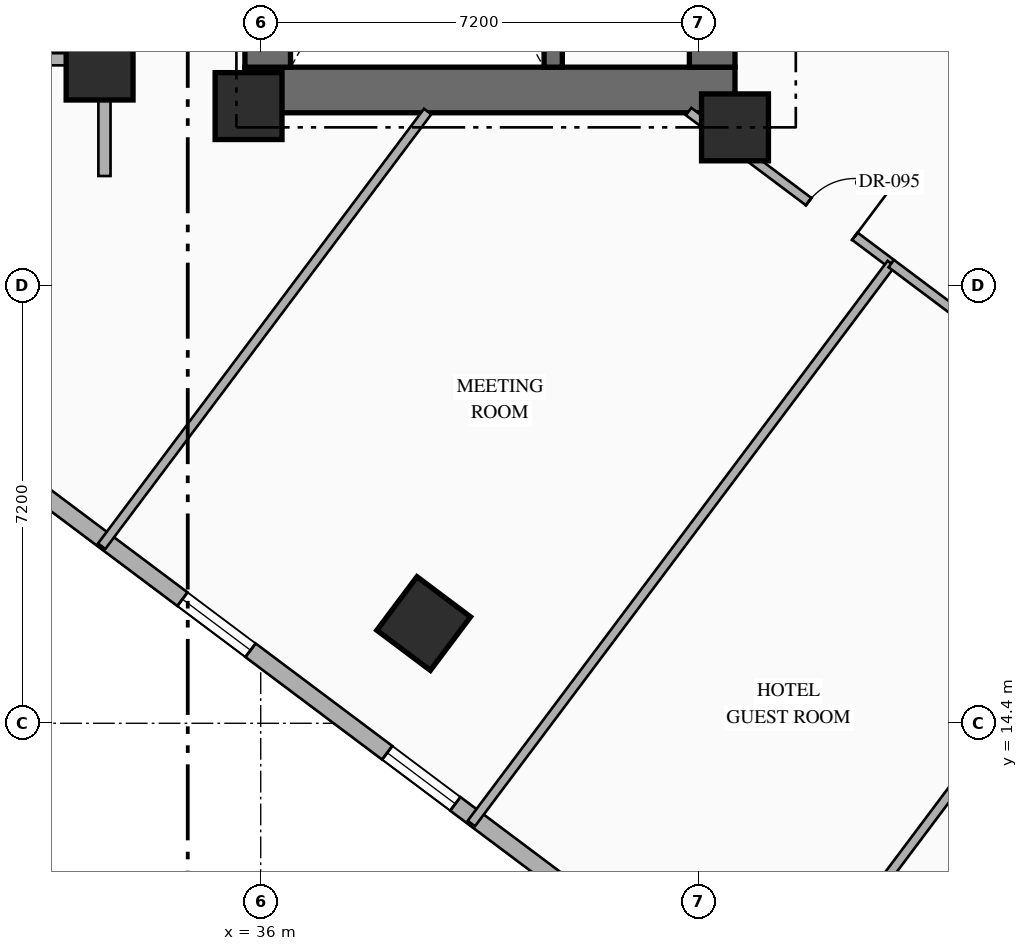
"""IFC4 building model, lengths in metres.
Left out: names, types, materials, properties, quantities, classifications, styles, units other than length and angle.
Written with IfcOpenShell. Run it as: python <this file> out.ifc"""

import sys

from ifc_helpers import new_model, si_unit, direction, frame, frame_2d, origin, origin_2d, place, context, subcontext, project, spatial, rectangle, hollow_rectangle, extrude, element, fill, save


model = new_model("IFC4")
c1 = context("Model", 3, precision=1e-05, world=origin(), true_north=direction((0.0, 1.0)))
c2 = subcontext(c1, "Body", "Model", "MODEL_VIEW")
j1 = project(units=[si_unit("LENGTHUNIT", "METRE"), si_unit("PLANEANGLEUNIT", "RADIAN")], contexts=[c1])
p1 = place(None, origin())
s1 = spatial("IfcSite", under=j1, at=p1, CompositionType="ELEMENT")
p2 = place(p1, origin())
s2 = spatial("IfcBuilding", under=s1, at=p2, CompositionType="ELEMENT")
p3 = place(p2, frame((0.0, 0.0, 50.0)))
s3 = spatial("IfcBuildingStorey", under=s2, at=p3, CompositionType="ELEMENT", Elevation=50.0)
p4 = place(p3, frame((35.74, 24.815, 0.0), z_axis=(0.0, 0.0, 1.0), x_axis=(1.0, 0.0, 0.0)))
e1 = element("IfcWall", 1, at=p4, inside=s3, PredefinedType="SHEAR", context=c2, shape_type="SweptSolid", body=[
    extrude(rectangle(XDim=8.06, YDim=0.75, at=frame_2d((4.03, 0.0))), origin(), (0.0, 0.0, 1.0), 3.35),
])
p5 = place(p3, frame((36.115, 25.19, 0.0), z_axis=(0.0, 0.0, 1.0), x_axis=(0.0, 1.0, 0.0)))
e2 = element("IfcWall", 2, at=p5, inside=s3, PredefinedType="SHEAR", context=c2, shape_type="SweptSolid", body=[
    extrude(rectangle(XDim=9.48, YDim=0.75, at=frame_2d((4.74, 0.0))), origin(), (0.0, 0.0, 1.0), 3.35),
])
p6 = place(p3, frame((43.425, 25.19, 0.0), z_axis=(0.0, 0.0, 1.0), x_axis=(0.0, 1.0, 0.0)))
e3 = element("IfcWall", 3, at=p6, inside=s3, PredefinedType="SHEAR", context=c2, shape_type="SweptSolid", body=[
    extrude(rectangle(XDim=9.48, YDim=0.75, at=frame_2d((4.74, 0.0))), origin(), (0.0, 0.0, 1.0), 3.35),
])
p7 = place(p6, frame((0.66, 0.0, 0.0)))
e4 = element("IfcOpeningElement", 4, at=p7, cuts=e3, PredefinedType="OPENING", context=c2, shape_type="SweptSolid", body=[
    extrude(rectangle(XDim=0.85, YDim=2.08, at=frame_2d((0.425, 1.04))), frame((0.0, 0.385, 0.0), z_axis=(0.0, -1.0, 0.0), x_axis=(1.0, 0.0, 0.0)), (0.0, 0.0, 1.0), 0.77),
])
p8 = place(p6, frame((2.86, 0.0, 0.0)))
e5 = element("IfcOpeningElement", 5, at=p8, cuts=e3, PredefinedType="OPENING", context=c2, shape_type="SweptSolid", body=[
    extrude(rectangle(XDim=0.85, YDim=2.08, at=frame_2d((0.425, 1.04))), frame((0.0, 0.385, 0.0), z_axis=(0.0, -1.0, 0.0), x_axis=(1.0, 0.0, 0.0)), (0.0, 0.0, 1.0), 0.77),
])
p9 = place(p6, frame((5.01, 0.0, 0.0)))
e6 = element("IfcOpeningElement", 6, at=p9, cuts=e3, PredefinedType="OPENING", context=c2, shape_type="SweptSolid", body=[
    extrude(rectangle(XDim=0.85, YDim=2.08, at=frame_2d((0.425, 1.04))), frame((0.0, 0.385, 0.0), z_axis=(0.0, -1.0, 0.0), x_axis=(1.0, 0.0, 0.0)), (0.0, 0.0, 1.0), 0.77),
])
p10 = place(p3, frame((40.81, 25.19, 0.0), z_axis=(0.0, 0.0, 1.0), x_axis=(0.0, 1.0, 0.0)))
e7 = element("IfcWall", 7, at=p10, inside=s3, PredefinedType="SHEAR", context=c2, shape_type="SweptSolid", body=[
    extrude(rectangle(XDim=9.48, YDim=0.3, at=frame_2d((4.74, 0.0))), origin(), (0.0, 0.0, 1.0), 3.35),
])
for number, where, z_axis, x_axis in (
    (8, (35.8, 24.55, 0.0), (0.0, 0.0, 1.0), (1.0, 0.0, 0.0)),
    (9, (43.8, 24.2, 0.0), (0.0, 0.0, 1.0), (1.0, 0.0, 0.0)),
):
    element("IfcColumn", number, at=place(p3, frame(where, z_axis=z_axis, x_axis=x_axis)), inside=s3, PredefinedType="COLUMN", context=c2, shape_type="SweptSolid", body=[
        extrude(rectangle(XDim=1.1, YDim=1.1, at=origin_2d()), origin(), (0.0, 0.0, 1.0), 3.35),
    ])
for number, where, z_axis, x_axis in (
    (10, (33.35, 25.2, 0.0), (0.0, 0.0, 1.0), (1.0, 0.0, 0.0)),
    (11, (38.68, 16.04, 0.0), (0.0, 0.0, 1.0), (0.8, -0.6, 0.0)),
):
    element("IfcColumn", number, at=place(p3, frame(where, z_axis=z_axis, x_axis=x_axis)), inside=s3, PredefinedType="COLUMN", context=c2, shape_type="SweptSolid", body=[
        extrude(hollow_rectangle(XDim=1.1, YDim=1.1, WallThickness=0.04, at=origin_2d()), origin(), (0.0, 0.0, 1.0), 3.35),
    ])
p11 = place(p3, frame((44.86, 40.73, 0.0), z_axis=(0.0, 0.0, 1.0), x_axis=(0.800006902154, -0.599990797017, 0.0)))
e12 = element("IfcWall", 12, at=p11, inside=s3, PredefinedType="STANDARD", context=c2, shape_type="SweptSolid", body=[
    extrude(rectangle(XDim=29.712, YDim=0.28, at=frame_2d((14.856, 0.0))), origin(), (0.0, 0.0, 1.0), 3.13),
])
p12 = place(p11, frame((14.249, 0.0, 0.0)))
e13 = element("IfcOpeningElement", 13, at=p12, cuts=e12, PredefinedType="OPENING", context=c2, shape_type="SweptSolid", body=[
    extrude(rectangle(XDim=1.1, YDim=2.2, at=frame_2d((0.55, 1.1))), frame((0.0, 0.15, 0.0), z_axis=(0.0, -1.0, 0.0), x_axis=(1.0, 0.0, 0.0)), (0.0, 0.0, 1.0), 0.3),
])
p13 = place(p11, frame((1.612, 0.0, 0.85)))
e14 = element("IfcOpeningElement", 14, at=p13, cuts=e12, PredefinedType="OPENING", context=c2, shape_type="SweptSolid", body=[
    extrude(rectangle(XDim=1.4, YDim=1.8, at=frame_2d((0.7, 0.9))), frame((0.0, 0.15, 0.0), z_axis=(0.0, -1.0, 0.0), x_axis=(1.0, 0.0, 0.0)), (0.0, 0.0, 1.0), 0.3),
])
p14 = place(p11, frame((5.667, 0.0, 0.85)))
e15 = element("IfcOpeningElement", 15, at=p14, cuts=e12, PredefinedType="OPENING", context=c2, shape_type="SweptSolid", body=[
    extrude(rectangle(XDim=1.4, YDim=1.8, at=frame_2d((0.7, 0.9))), frame((0.0, 0.15, 0.0), z_axis=(0.0, -1.0, 0.0), x_axis=(1.0, 0.0, 0.0)), (0.0, 0.0, 1.0), 0.3),
])
p15 = place(p11, frame((9.912, 0.0, 0.85)))
e16 = element("IfcOpeningElement", 16, at=p15, cuts=e12, PredefinedType="OPENING", context=c2, shape_type="SweptSolid", body=[
    extrude(rectangle(XDim=1.4, YDim=1.8, at=frame_2d((0.7, 0.9))), frame((0.0, 0.15, 0.0), z_axis=(0.0, -1.0, 0.0), x_axis=(1.0, 0.0, 0.0)), (0.0, 0.0, 1.0), 0.3),
])
p16 = place(p11, frame((19.528, 0.0, 0.85)))
e17 = element("IfcOpeningElement", 17, at=p16, cuts=e12, PredefinedType="OPENING", context=c2, shape_type="SweptSolid", body=[
    extrude(rectangle(XDim=1.4, YDim=1.8, at=frame_2d((0.7, 0.9))), frame((0.0, 0.15, 0.0), z_axis=(0.0, -1.0, 0.0), x_axis=(1.0, 0.0, 0.0)), (0.0, 0.0, 1.0), 0.3),
])
p17 = place(p11, frame((23.451, 0.0, 0.85)))
e18 = element("IfcOpeningElement", 18, at=p17, cuts=e12, PredefinedType="OPENING", context=c2, shape_type="SweptSolid", body=[
    extrude(rectangle(XDim=1.4, YDim=1.8, at=frame_2d((0.7, 0.9))), frame((0.0, 0.15, 0.0), z_axis=(0.0, -1.0, 0.0), x_axis=(1.0, 0.0, 0.0)), (0.0, 0.0, 1.0), 0.3),
])
p18 = place(p11, frame((27.852, 0.0, 0.85)))
e19 = element("IfcOpeningElement", 19, at=p18, cuts=e12, PredefinedType="OPENING", context=c2, shape_type="SweptSolid", body=[
    extrude(rectangle(XDim=1.4, YDim=1.8, at=frame_2d((0.7, 0.9))), frame((0.0, 0.15, 0.0), z_axis=(0.0, -1.0, 0.0), x_axis=(1.0, 0.0, 0.0)), (0.0, 0.0, 1.0), 0.3),
])
p19 = place(p3, frame((53.318, 2.487, 0.0), z_axis=(0.0, 0.0, 1.0), x_axis=(-0.800004174678, 0.599994433723, 0.0)))
e20 = element("IfcWall", 20, at=p19, inside=s3, PredefinedType="STANDARD", context=c2, shape_type="SweptSolid", body=[
    extrude(rectangle(XDim=35.089, YDim=0.28, at=frame_2d((17.544, 0.0))), origin(), (0.0, 0.0, 1.0), 3.13),
])
p20 = place(p19, frame((1.931, 0.0, 0.85)))
e21 = element("IfcOpeningElement", 21, at=p20, cuts=e20, PredefinedType="OPENING", context=c2, shape_type="SweptSolid", body=[
    extrude(rectangle(XDim=1.4, YDim=1.8, at=frame_2d((0.7, 0.9))), frame((0.0, 0.15, 0.0), z_axis=(0.0, -1.0, 0.0), x_axis=(1.0, 0.0, 0.0)), (0.0, 0.0, 1.0), 0.3),
])
p21 = place(p19, frame((6.819, 0.0, 0.85)))
e22 = element("IfcOpeningElement", 22, at=p21, cuts=e20, PredefinedType="OPENING", context=c2, shape_type="SweptSolid", body=[
    extrude(rectangle(XDim=1.4, YDim=1.8, at=frame_2d((0.7, 0.9))), frame((0.0, 0.15, 0.0), z_axis=(0.0, -1.0, 0.0), x_axis=(1.0, 0.0, 0.0)), (0.0, 0.0, 1.0), 0.3),
])
p22 = place(p19, frame((11.832, 0.0, 0.85)))
e23 = element("IfcOpeningElement", 23, at=p22, cuts=e20, PredefinedType="OPENING", context=c2, shape_type="SweptSolid", body=[
    extrude(rectangle(XDim=1.4, YDim=1.8, at=frame_2d((0.7, 0.9))), frame((0.0, 0.15, 0.0), z_axis=(0.0, -1.0, 0.0), x_axis=(1.0, 0.0, 0.0)), (0.0, 0.0, 1.0), 0.3),
])
p23 = place(p19, frame((17.647, 0.0, 0.85)))
e24 = element("IfcOpeningElement", 24, at=p23, cuts=e20, PredefinedType="OPENING", context=c2, shape_type="SweptSolid", body=[
    extrude(rectangle(XDim=1.4, YDim=1.8, at=frame_2d((0.7, 0.9))), frame((0.0, 0.15, 0.0), z_axis=(0.0, -1.0, 0.0), x_axis=(1.0, 0.0, 0.0)), (0.0, 0.0, 1.0), 0.3),
])
p24 = place(p19, frame((21.857, 0.0, 0.85)))
e25 = element("IfcOpeningElement", 25, at=p24, cuts=e20, PredefinedType="OPENING", context=c2, shape_type="SweptSolid", body=[
    extrude(rectangle(XDim=1.4, YDim=1.8, at=frame_2d((0.7, 0.9))), frame((0.0, 0.15, 0.0), z_axis=(0.0, -1.0, 0.0), x_axis=(1.0, 0.0, 0.0)), (0.0, 0.0, 1.0), 0.3),
])
p25 = place(p19, frame((26.87, 0.0, 0.85)))
e26 = element("IfcOpeningElement", 26, at=p25, cuts=e20, PredefinedType="OPENING", context=c2, shape_type="SweptSolid", body=[
    extrude(rectangle(XDim=1.4, YDim=1.8, at=frame_2d((0.7, 0.9))), frame((0.0, 0.15, 0.0), z_axis=(0.0, -1.0, 0.0), x_axis=(1.0, 0.0, 0.0)), (0.0, 0.0, 1.0), 0.3),
])
p26 = place(p19, frame((31.757, 0.0, 0.85)))
e27 = element("IfcOpeningElement", 27, at=p26, cuts=e20, PredefinedType="OPENING", context=c2, shape_type="SweptSolid", body=[
    extrude(rectangle(XDim=1.4, YDim=1.8, at=frame_2d((0.7, 0.9))), frame((0.0, 0.15, 0.0), z_axis=(0.0, -1.0, 0.0), x_axis=(1.0, 0.0, 0.0)), (0.0, 0.0, 1.0), 0.3),
])
p27 = place(p3, frame((33.43, 23.4, 0.0), z_axis=(0.0, 0.0, 1.0), x_axis=(0.0, 1.0, 0.0)))
e28 = element("IfcWall", 28, at=p27, inside=s3, PredefinedType="STANDARD", context=c2, shape_type="SweptSolid", body=[
    extrude(rectangle(XDim=4.08, YDim=0.2, at=frame_2d((2.04, 0.0))), origin(), (0.0, 0.0, 1.0), 2.425),
])
p28 = place(p3, frame((25.55, 25.32, 0.0), z_axis=(0.0, 0.0, 1.0), x_axis=(1.0, 0.0, 0.0)))
e29 = element("IfcWall", 29, at=p28, inside=s3, PredefinedType="STANDARD", context=c2, shape_type="SweptSolid", body=[
    extrude(rectangle(XDim=7.88, YDim=0.2, at=frame_2d((3.94, 0.0))), origin(), (0.0, 0.0, 1.0), 2.525),
])
p29 = place(p3, frame((43.037, 24.46, 0.0), z_axis=(0.0, 0.0, 1.0), x_axis=(0.799971872363, -0.600037501685, 0.0)))
e30 = element("IfcWall", 30, at=p29, inside=s3, PredefinedType="PARTITIONING", context=c2, shape_type="SweptSolid", body=[
    extrude(rectangle(XDim=4.167, YDim=0.15, at=frame_2d((2.083, 0.0))), origin(), (0.0, 0.0, 1.0), 2.425),
])
p30 = place(p29, frame((2.468, 0.0, 0.0)))
e31 = element("IfcOpeningElement", 31, at=p30, cuts=e30, PredefinedType="OPENING", context=c2, shape_type="SweptSolid", body=[
    extrude(rectangle(XDim=0.95, YDim=2.15, at=frame_2d((0.475, 1.075))), frame((0.0, 0.085, 0.0), z_axis=(0.0, -1.0, 0.0), x_axis=(1.0, 0.0, 0.0)), (0.0, 0.0, 1.0), 0.17),
])
p31 = place(p3, frame((33.384, 17.312, 0.0), z_axis=(0.0, 0.0, 1.0), x_axis=(0.600008743659, 0.799993442181, 0.0)))
e32 = element("IfcWall", 32, at=p31, inside=s3, PredefinedType="PARTITIONING", context=c2, shape_type="SweptSolid", body=[
    extrude(rectangle(XDim=8.935, YDim=0.15, at=frame_2d((4.468, 0.0))), origin(), (0.0, 0.0, 1.0), 3.13),
])
p32 = place(p3, frame((39.464, 12.752, 0.0), z_axis=(0.0, 0.0, 1.0), x_axis=(0.6, 0.8, 0.0)))
e33 = element("IfcWall", 33, at=p32, inside=s3, PredefinedType="PARTITIONING", context=c2, shape_type="SweptSolid", body=[
    extrude(rectangle(XDim=11.51, YDim=0.15, at=frame_2d((5.755, 0.0))), origin(), (0.0, 0.0, 1.0), 3.13),
])
p33 = place(p3, frame((46.37, 21.96, 0.0), z_axis=(0.0, 0.0, 1.0), x_axis=(0.799977170108, -0.600030438649, 0.0)))
e34 = element("IfcWall", 34, at=p33, inside=s3, PredefinedType="PARTITIONING", context=c2, shape_type="SweptSolid", body=[
    extrude(rectangle(XDim=3.85, YDim=0.15, at=frame_2d((1.925, 0.0))), origin(), (0.0, 0.0, 1.0), 2.425),
])
p34 = place(p33, frame((1.45, 0.0, 0.0)))
e35 = element("IfcOpeningElement", 35, at=p34, cuts=e34, PredefinedType="OPENING", context=c2, shape_type="SweptSolid", body=[
    extrude(rectangle(XDim=0.95, YDim=2.15, at=frame_2d((0.475, 1.075))), frame((0.0, 0.085, 0.0), z_axis=(0.0, -1.0, 0.0), x_axis=(1.0, 0.0, 0.0)), (0.0, 0.0, 1.0), 0.17),
])
p35 = place(p3, frame((44.36, 9.28, 0.0), z_axis=(0.0, 0.0, 1.0), x_axis=(0.599986233332, 0.800010324816, 0.0)))
e36 = element("IfcWall", 36, at=p35, inside=s3, PredefinedType="PARTITIONING", context=c2, shape_type="SweptSolid", body=[
    extrude(rectangle(XDim=11.35, YDim=0.15, at=frame_2d((5.675, 0.0))), origin(), (0.0, 0.0, 1.0), 2.425),
])
p36 = place(p23, origin())
e37 = element("IfcWindow", 37, at=p36, inside=s3, PartitioningType="SINGLE_PANEL", PredefinedType="WINDOW", context=c2, shape_type="SweptSolid", body=[
    extrude(rectangle(XDim=1.4, YDim=1.8, at=frame_2d((0.7, 0.9))), frame((0.0, 0.03, 0.0), z_axis=(0.0, -1.0, 0.0), x_axis=(1.0, 0.0, 0.0)), (0.0, 0.0, 1.0), 0.06),
])
fill(e24, e37)
p37 = place(p24, origin())
e38 = element("IfcWindow", 38, at=p37, inside=s3, PartitioningType="SINGLE_PANEL", PredefinedType="WINDOW", context=c2, shape_type="SweptSolid", body=[
    extrude(rectangle(XDim=1.4, YDim=1.8, at=frame_2d((0.7, 0.9))), frame((0.0, 0.03, 0.0), z_axis=(0.0, -1.0, 0.0), x_axis=(1.0, 0.0, 0.0)), (0.0, 0.0, 1.0), 0.06),
])
fill(e25, e38)
p38 = place(p30, origin())
e39 = element("IfcDoor", 39, at=p38, inside=s3, OperationType="SINGLE_SWING_RIGHT", PredefinedType="DOOR", context=c2, shape_type="SweptSolid", body=[
    extrude(rectangle(XDim=0.95, YDim=2.15, at=frame_2d((0.475, 1.075))), frame((0.0, 0.025, 0.0), z_axis=(0.0, -1.0, 0.0), x_axis=(1.0, 0.0, 0.0)), (0.0, 0.0, 1.0), 0.05),
])
fill(e31, e39)
save(model, sys.argv[1])
